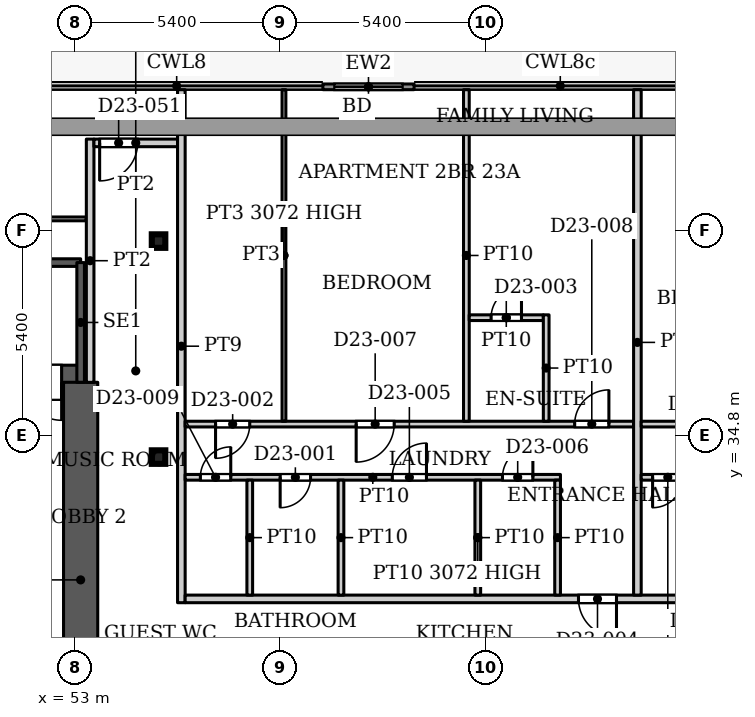
"""IFC4 building model, lengths in metres.
Left out: names, types, materials, properties, quantities, classifications, styles, units other than length and angle.
Written with IfcOpenShell. Run it as: python <this file> out.ifc"""

import sys

from ifc_helpers import new_model, si_unit, direction, frame, frame_2d, origin, origin_2d, place, context, subcontext, project, spatial, rectangle, hollow_rectangle, extrude, source, transform, mapped, element, fill, save


model = new_model("IFC4")
c1 = context("Model", 3, precision=1e-05, world=origin(), true_north=direction((0.0, 1.0)))
c2 = subcontext(c1, "Body", "Model", "MODEL_VIEW")
j1 = project(units=[si_unit("LENGTHUNIT", "METRE"), si_unit("PLANEANGLEUNIT", "RADIAN")], contexts=[c1])
p1 = place(None, origin())
s1 = spatial("IfcSite", under=j1, at=p1, CompositionType="ELEMENT")
p2 = place(p1, origin())
s2 = spatial("IfcBuilding", under=s1, at=p2, CompositionType="ELEMENT")
p3 = place(p2, frame((0.0, 0.0, 101.9)))
s3 = spatial("IfcBuildingStorey", under=s2, at=p3, CompositionType="ELEMENT", Elevation=101.9)
for number, where, z_axis, x_axis in (
    (1, (55.2, 34.232, 0.0), (0.0, 0.0, 1.0), (1.0, 0.0, 0.0)),
    (2, (55.2, 39.916, 0.0), (0.0, 0.0, 1.0), (1.0, 0.0, 0.0)),
):
    element("IfcColumn", number, at=place(p3, frame(where, z_axis=z_axis, x_axis=x_axis)), inside=s3, PredefinedType="COLUMN", context=c2, shape_type="SweptSolid", body=[
        extrude(hollow_rectangle(XDim=0.356, YDim=0.356, WallThickness=0.016, InnerFilletRadius=0.016, OuterFilletRadius=0.032, at=origin_2d()), origin(), (0.0, 0.0, 1.0), 3.9),
    ])
p4 = place(p3, frame((34.75, 36.2, 0.0), z_axis=(0.0, 0.0, 1.0), x_axis=(1.0, 0.0, 0.0)))
e3 = element("IfcWall", 3, at=p4, inside=s3, PredefinedType="SHEAR", context=c2, shape_type="SweptSolid", body=[
    extrude(rectangle(XDim=18.4, YDim=0.9, at=frame_2d((9.2, 0.0))), origin(), (0.0, 0.0, 1.0), 3.9),
])
p5 = place(p4, frame((16.9, 0.0, 0.0)))
e4 = element("IfcOpeningElement", 4, at=p5, cuts=e3, PredefinedType="OPENING", context=c2, shape_type="SweptSolid", body=[
    extrude(rectangle(XDim=1.0, YDim=2.2, at=frame_2d((0.5, 1.1))), frame((0.0, 0.46, 0.0), z_axis=(0.0, -1.0, 0.0), x_axis=(1.0, 0.0, 0.0)), (0.0, 0.0, 1.0), 0.92),
])
p6 = place(p3, frame((53.15, 25.8, 0.0), z_axis=(0.0, 0.0, 1.0), x_axis=(0.0, 1.0, 0.0)))
e5 = element("IfcWall", 5, at=p6, inside=s3, PredefinedType="SHEAR", context=c2, shape_type="SweptSolid", body=[
    extrude(rectangle(XDim=10.4, YDim=0.9, at=frame_2d((5.2, 0.0))), origin(), (0.0, 0.0, 1.0), 3.9),
])
p7 = place(p3, frame((59.524, 43.975, 0.0), z_axis=(0.0, 0.0, 1.0), x_axis=(1.0, 0.0, 0.0)))
e6 = element("IfcWall", 6, at=p7, inside=s3, PredefinedType="SOLIDWALL", context=c2, shape_type="SweptSolid", body=[
    extrude(rectangle(XDim=2.4, YDim=0.15, at=frame_2d((1.2, 0.0))), origin(), (0.0, 0.0, 1.0), 3.75),
])
p8 = place(p7, frame((0.3, 0.0, 0.0)))
e7 = element("IfcOpeningElement", 7, at=p8, cuts=e6, PredefinedType="OPENING", context=c2, shape_type="SweptSolid", body=[
    extrude(rectangle(XDim=1.8, YDim=2.4, at=frame_2d((0.9, 1.2))), frame((0.0, 0.085, 0.0), z_axis=(0.0, -1.0, 0.0), x_axis=(1.0, 0.0, 0.0)), (0.0, 0.0, 1.0), 0.17),
])
p9 = place(p3, frame((43.99, 39.35, 0.0), z_axis=(0.0, 0.0, 1.0), x_axis=(1.0, 0.0, 0.0)))
e8 = element("IfcWall", 8, at=p9, inside=s3, PredefinedType="SHEAR", context=c2, shape_type="SweptSolid", body=[
    extrude(rectangle(XDim=9.16, YDim=0.2, at=frame_2d((4.58, 0.0))), origin(), (0.0, 0.0, 1.0), 3.9),
])
p10 = place(p3, frame((53.15, 36.2, 0.0), z_axis=(0.0, 0.0, 1.0), x_axis=(0.0, 1.0, 0.0)))
e9 = element("IfcWall", 9, at=p10, inside=s3, PredefinedType="SHEAR", context=c2, shape_type="SweptSolid", body=[
    extrude(rectangle(XDim=3.15, YDim=0.2, at=frame_2d((1.575, 0.0))), origin(), (0.0, 0.0, 1.0), 3.9),
])
p11 = place(p3, frame((38.449, 40.5, 0.0), z_axis=(0.0, 0.0, 1.0), x_axis=(1.0, 0.0, 0.0)))
e10 = element("IfcWall", 10, at=p11, inside=s3, PredefinedType="PARTITIONING", context=c2, shape_type="SweptSolid", body=[
    extrude(rectangle(XDim=14.851, YDim=0.1, at=frame_2d((7.426, 0.0))), origin(), (0.0, 0.0, 1.0), 3.6),
])
p12 = place(p11, frame((6.751, 0.0, 0.0)))
e11 = element("IfcOpeningElement", 11, at=p12, cuts=e10, PredefinedType="OPENING", context=c2, shape_type="SweptSolid", body=[
    extrude(rectangle(XDim=1.0, YDim=2.1, at=frame_2d((0.5, 1.05))), frame((0.0, 0.06, 0.0), z_axis=(0.0, -1.0, 0.0), x_axis=(1.0, 0.0, 0.0)), (0.0, 0.0, 1.0), 0.12),
])
p13 = place(p3, frame((53.4, 36.199, 0.0), z_axis=(0.0, 0.0, 1.0), x_axis=(0.0, 1.0, 0.0)))
e12 = element("IfcWall", 12, at=p13, inside=s3, PredefinedType="PARTITIONING", context=c2, shape_type="SweptSolid", body=[
    extrude(rectangle(XDim=6.401, YDim=0.2, at=frame_2d((3.201, 0.0))), origin(), (0.0, 0.0, 1.0), 3.6),
])
p14 = place(p3, frame((53.5, 42.5, 0.0), z_axis=(0.0, 0.0, 1.0), x_axis=(1.0, 0.0, 0.0)))
e13 = element("IfcWall", 13, at=p14, inside=s3, PredefinedType="PARTITIONING", context=c2, shape_type="SweptSolid", body=[
    extrude(rectangle(XDim=2.2, YDim=0.2, at=frame_2d((1.1, 0.0))), origin(), (0.0, 0.0, 1.0), 3.6),
])
p15 = place(p14, frame((0.15, 0.0, 0.0)))
e14 = element("IfcOpeningElement", 14, at=p15, cuts=e13, PredefinedType="OPENING", context=c2, shape_type="SweptSolid", body=[
    extrude(rectangle(XDim=1.0, YDim=2.1, at=frame_2d((0.5, 1.05))), frame((0.0, 0.11, 0.0), z_axis=(0.0, -1.0, 0.0), x_axis=(1.0, 0.0, 0.0)), (0.0, 0.0, 1.0), 0.22),
])
p16 = place(p3, frame((55.8, 30.4, 0.0), z_axis=(0.0, 0.0, 1.0), x_axis=(0.0, 1.0, 0.0)))
e15 = element("IfcWall", 15, at=p16, inside=s3, PredefinedType="PARTITIONING", context=c2, shape_type="SweptSolid", body=[
    extrude(rectangle(XDim=13.5, YDim=0.2, at=frame_2d((6.75, 0.0))), origin(), (0.0, 0.0, 1.0), 3.6),
])
p17 = place(p3, frame((55.9, 30.5, 0.0), z_axis=(0.0, 0.0, 1.0), x_axis=(1.0, 0.0, 0.0)))
e16 = element("IfcWall", 16, at=p17, inside=s3, PredefinedType="PARTITIONING", context=c2, shape_type="SweptSolid", body=[
    extrude(rectangle(XDim=42.2, YDim=0.2, at=frame_2d((21.1, 0.0))), origin(), (0.0, 0.0, 1.0), 3.6),
])
p18 = place(p17, frame((10.35, 0.0, 0.0)))
e17 = element("IfcOpeningElement", 17, at=p18, cuts=e16, PredefinedType="OPENING", context=c2, shape_type="SweptSolid", body=[
    extrude(rectangle(XDim=1.0, YDim=2.1, at=frame_2d((0.5, 1.05))), frame((0.0, 0.11, 0.0), z_axis=(0.0, -1.0, 0.0), x_axis=(1.0, 0.0, 0.0)), (0.0, 0.0, 1.0), 0.22),
])
p19 = place(p17, frame((16.65, 0.0, 0.0)))
e18 = element("IfcOpeningElement", 18, at=p19, cuts=e16, PredefinedType="OPENING", context=c2, shape_type="SweptSolid", body=[
    extrude(rectangle(XDim=1.0, YDim=2.1, at=frame_2d((0.5, 1.05))), frame((0.0, 0.11, 0.0), z_axis=(0.0, -1.0, 0.0), x_axis=(1.0, 0.0, 0.0)), (0.0, 0.0, 1.0), 0.22),
])
p20 = place(p17, frame((27.6, 0.0, 0.0)))
e19 = element("IfcOpeningElement", 19, at=p20, cuts=e16, PredefinedType="OPENING", context=c2, shape_type="SweptSolid", body=[
    extrude(rectangle(XDim=1.0, YDim=2.1, at=frame_2d((0.5, 1.05))), frame((0.0, 0.11, 0.0), z_axis=(0.0, -1.0, 0.0), x_axis=(1.0, 0.0, 0.0)), (0.0, 0.0, 1.0), 0.22),
])
p21 = place(p17, frame((36.0, 0.0, 0.0)))
e20 = element("IfcOpeningElement", 20, at=p21, cuts=e16, PredefinedType="OPENING", context=c2, shape_type="SweptSolid", body=[
    extrude(rectangle(XDim=1.0, YDim=2.1, at=frame_2d((0.5, 1.05))), frame((0.0, 0.11, 0.0), z_axis=(0.0, -1.0, 0.0), x_axis=(1.0, 0.0, 0.0)), (0.0, 0.0, 1.0), 0.22),
])
p22 = place(p3, frame((55.9, 33.7, 0.0), z_axis=(0.0, 0.0, 1.0), x_axis=(1.0, 0.0, 0.0)))
e21 = element("IfcWall", 21, at=p22, inside=s3, PredefinedType="PARTITIONING", context=c2, shape_type="SweptSolid", body=[
    extrude(rectangle(XDim=9.875, YDim=0.15, at=frame_2d((4.938, 0.0))), origin(), (0.0, 0.0, 1.0), 3.6),
])
p23 = place(p22, frame((2.5, 0.0, 0.0)))
e22 = element("IfcOpeningElement", 22, at=p23, cuts=e21, PredefinedType="OPENING", context=c2, shape_type="SweptSolid", body=[
    extrude(rectangle(XDim=0.8, YDim=2.1, at=frame_2d((0.4, 1.05))), frame((0.0, 0.085, 0.0), z_axis=(0.0, -1.0, 0.0), x_axis=(1.0, 0.0, 0.0)), (0.0, 0.0, 1.0), 0.17),
])
p24 = place(p22, frame((5.45, 0.0, 0.0)))
e23 = element("IfcOpeningElement", 23, at=p24, cuts=e21, PredefinedType="OPENING", context=c2, shape_type="SweptSolid", body=[
    extrude(rectangle(XDim=0.9, YDim=2.1, at=frame_2d((0.45, 1.05))), frame((0.0, 0.085, 0.0), z_axis=(0.0, -1.0, 0.0), x_axis=(1.0, 0.0, 0.0)), (0.0, 0.0, 1.0), 0.17),
])
p25 = place(p22, frame((8.35, 0.0, 0.0)))
e24 = element("IfcOpeningElement", 24, at=p25, cuts=e21, PredefinedType="OPENING", context=c2, shape_type="SweptSolid", body=[
    extrude(rectangle(XDim=0.8, YDim=2.1, at=frame_2d((0.4, 1.05))), frame((0.0, 0.085, 0.0), z_axis=(0.0, -1.0, 0.0), x_axis=(1.0, 0.0, 0.0)), (0.0, 0.0, 1.0), 0.17),
])
p26 = place(p22, frame((0.4, 0.0, 0.0)))
e25 = element("IfcOpeningElement", 25, at=p26, cuts=e21, PredefinedType="OPENING", context=c2, shape_type="SweptSolid", body=[
    extrude(rectangle(XDim=0.8, YDim=2.1, at=frame_2d((0.4, 1.05))), frame((0.0, 0.085, 0.0), z_axis=(0.0, -1.0, 0.0), x_axis=(1.0, 0.0, 0.0)), (0.0, 0.0, 1.0), 0.17),
])
p27 = place(p3, frame((55.9, 35.1, 0.0), z_axis=(0.0, 0.0, 1.0), x_axis=(1.0, 0.0, 0.0)))
e26 = element("IfcWall", 26, at=p27, inside=s3, PredefinedType="PARTITIONING", context=c2, shape_type="SweptSolid", body=[
    extrude(rectangle(XDim=11.8, YDim=0.15, at=frame_2d((5.9, 0.0))), origin(), (0.0, 0.0, 1.0), 3.6),
])
p28 = place(p27, frame((0.8, 0.0, 0.0)))
e27 = element("IfcOpeningElement", 27, at=p28, cuts=e26, PredefinedType="OPENING", context=c2, shape_type="SweptSolid", body=[
    extrude(rectangle(XDim=0.9, YDim=2.1, at=frame_2d((0.45, 1.05))), frame((0.0, 0.085, 0.0), z_axis=(0.0, -1.0, 0.0), x_axis=(1.0, 0.0, 0.0)), (0.0, 0.0, 1.0), 0.17),
])
p29 = place(p27, frame((4.5, 0.0, 0.0)))
e28 = element("IfcOpeningElement", 28, at=p29, cuts=e26, PredefinedType="OPENING", context=c2, shape_type="SweptSolid", body=[
    extrude(rectangle(XDim=1.0, YDim=2.1, at=frame_2d((0.5, 1.05))), frame((0.0, 0.085, 0.0), z_axis=(0.0, -1.0, 0.0), x_axis=(1.0, 0.0, 0.0)), (0.0, 0.0, 1.0), 0.17),
])
p30 = place(p27, frame((10.25, 0.0, 0.0)))
e29 = element("IfcOpeningElement", 29, at=p30, cuts=e26, PredefinedType="OPENING", context=c2, shape_type="SweptSolid", body=[
    extrude(rectangle(XDim=0.9, YDim=2.1, at=frame_2d((0.45, 1.05))), frame((0.0, 0.085, 0.0), z_axis=(0.0, -1.0, 0.0), x_axis=(1.0, 0.0, 0.0)), (0.0, 0.0, 1.0), 0.17),
])
p31 = place(p3, frame((57.6, 30.6, 0.0), z_axis=(0.0, 0.0, 1.0), x_axis=(0.0, 1.0, 0.0)))
e30 = element("IfcWall", 30, at=p31, inside=s3, PredefinedType="PARTITIONING", context=c2, shape_type="SweptSolid", body=[
    extrude(rectangle(XDim=3.025, YDim=0.15, at=frame_2d((1.512, 0.0))), origin(), (0.0, 0.0, 1.0), 3.6),
])
p32 = place(p3, frame((58.5, 35.175, 0.0), z_axis=(0.0, 0.0, 1.0), x_axis=(0.0, 1.0, 0.0)))
e31 = element("IfcWall", 31, at=p32, inside=s3, PredefinedType="PARTITIONING", context=c2, shape_type="SweptSolid", body=[
    extrude(rectangle(XDim=8.725, YDim=0.1, at=frame_2d((4.362, 0.0))), origin(), (0.0, 0.0, 1.0), 3.072),
])
p33 = place(p3, frame((60.0, 30.6, 0.0), z_axis=(0.0, 0.0, 1.0), x_axis=(0.0, 1.0, 0.0)))
e32 = element("IfcWall", 32, at=p33, inside=s3, PredefinedType="PARTITIONING", context=c2, shape_type="SweptSolid", body=[
    extrude(rectangle(XDim=3.025, YDim=0.15, at=frame_2d((1.512, 0.0))), origin(), (0.0, 0.0, 1.0), 3.6),
])
p34 = place(p3, frame((63.3, 35.175, 0.0), z_axis=(0.0, 0.0, 1.0), x_axis=(0.0, 1.0, 0.0)))
e33 = element("IfcWall", 33, at=p34, inside=s3, PredefinedType="PARTITIONING", context=c2, shape_type="SweptSolid", body=[
    extrude(rectangle(XDim=8.725, YDim=0.15, at=frame_2d((4.362, 0.0))), origin(), (0.0, 0.0, 1.0), 3.6),
])
p35 = place(p3, frame((63.375, 37.9, 0.0), z_axis=(0.0, 0.0, 1.0), x_axis=(1.0, 0.0, 0.0)))
e34 = element("IfcWall", 34, at=p35, inside=s3, PredefinedType="PARTITIONING", context=c2, shape_type="SweptSolid", body=[
    extrude(rectangle(XDim=1.95, YDim=0.15, at=frame_2d((0.975, 0.0))), origin(), (0.0, 0.0, 1.0), 3.6),
])
p36 = place(p35, frame((0.575, 0.0, 0.0)))
e35 = element("IfcOpeningElement", 35, at=p36, cuts=e34, PredefinedType="OPENING", context=c2, shape_type="SweptSolid", body=[
    extrude(rectangle(XDim=0.8, YDim=2.1, at=frame_2d((0.4, 1.05))), frame((0.0, 0.085, 0.0), z_axis=(0.0, -1.0, 0.0), x_axis=(1.0, 0.0, 0.0)), (0.0, 0.0, 1.0), 0.17),
])
p37 = place(p3, frame((63.6, 30.6, 0.0), z_axis=(0.0, 0.0, 1.0), x_axis=(0.0, 1.0, 0.0)))
e36 = element("IfcWall", 36, at=p37, inside=s3, PredefinedType="PARTITIONING", context=c2, shape_type="SweptSolid", body=[
    extrude(rectangle(XDim=3.025, YDim=0.15, at=frame_2d((1.512, 0.0))), origin(), (0.0, 0.0, 1.0), 3.072),
])
p38 = place(p3, frame((65.4, 35.175, 0.0), z_axis=(0.0, 0.0, 1.0), x_axis=(0.0, 1.0, 0.0)))
e37 = element("IfcWall", 37, at=p38, inside=s3, PredefinedType="PARTITIONING", context=c2, shape_type="SweptSolid", body=[
    extrude(rectangle(XDim=2.8, YDim=0.15, at=frame_2d((1.4, 0.0))), origin(), (0.0, 0.0, 1.0), 3.6),
])
p39 = place(p3, frame((65.7, 30.6, 0.0), z_axis=(0.0, 0.0, 1.0), x_axis=(0.0, 1.0, 0.0)))
e38 = element("IfcWall", 38, at=p39, inside=s3, PredefinedType="PARTITIONING", context=c2, shape_type="SweptSolid", body=[
    extrude(rectangle(XDim=3.025, YDim=0.15, at=frame_2d((1.512, 0.0))), origin(), (0.0, 0.0, 1.0), 3.6),
])
p40 = place(p3, frame((67.8, 30.6, 0.0), z_axis=(0.0, 0.0, 1.0), x_axis=(0.0, 1.0, 0.0)))
e39 = element("IfcWall", 39, at=p40, inside=s3, PredefinedType="PARTITIONING", context=c2, shape_type="SweptSolid", body=[
    extrude(rectangle(XDim=13.3, YDim=0.2, at=frame_2d((6.65, 0.0))), origin(), (0.0, 0.0, 1.0), 3.6),
])
p41 = place(p3, frame((67.9, 33.7, 0.0), z_axis=(0.0, 0.0, 1.0), x_axis=(1.0, 0.0, 0.0)))
e40 = element("IfcWall", 40, at=p41, inside=s3, PredefinedType="PARTITIONING", context=c2, shape_type="SweptSolid", body=[
    extrude(rectangle(XDim=4.175, YDim=0.15, at=frame_2d((2.087, 0.0))), origin(), (0.0, 0.0, 1.0), 3.6),
])
p42 = place(p41, frame((2.5, 0.0, 0.0)))
e41 = element("IfcOpeningElement", 41, at=p42, cuts=e40, PredefinedType="OPENING", context=c2, shape_type="SweptSolid", body=[
    extrude(rectangle(XDim=0.8, YDim=2.1, at=frame_2d((0.4, 1.05))), frame((0.0, 0.085, 0.0), z_axis=(0.0, -1.0, 0.0), x_axis=(1.0, 0.0, 0.0)), (0.0, 0.0, 1.0), 0.17),
])
p43 = place(p41, frame((0.3, 0.0, 0.0)))
e42 = element("IfcOpeningElement", 42, at=p43, cuts=e40, PredefinedType="OPENING", context=c2, shape_type="SweptSolid", body=[
    extrude(rectangle(XDim=0.8, YDim=2.1, at=frame_2d((0.4, 1.05))), frame((0.0, 0.085, 0.0), z_axis=(0.0, -1.0, 0.0), x_axis=(1.0, 0.0, 0.0)), (0.0, 0.0, 1.0), 0.17),
])
p44 = place(p3, frame((67.9, 35.1, 0.0), z_axis=(0.0, 0.0, 1.0), x_axis=(1.0, 0.0, 0.0)))
e43 = element("IfcWall", 43, at=p44, inside=s3, PredefinedType="PARTITIONING", context=c2, shape_type="SweptSolid", body=[
    extrude(rectangle(XDim=9.4, YDim=0.15, at=frame_2d((4.7, 0.0))), origin(), (0.0, 0.0, 1.0), 3.6),
])
p45 = place(p44, frame((1.4, 0.0, 0.0)))
e44 = element("IfcOpeningElement", 44, at=p45, cuts=e43, PredefinedType="OPENING", context=c2, shape_type="SweptSolid", body=[
    extrude(rectangle(XDim=0.9, YDim=2.1, at=frame_2d((0.45, 1.05))), frame((0.0, 0.085, 0.0), z_axis=(0.0, -1.0, 0.0), x_axis=(1.0, 0.0, 0.0)), (0.0, 0.0, 1.0), 0.17),
])
p46 = place(p44, frame((6.15, 0.0, 0.0)))
e45 = element("IfcOpeningElement", 45, at=p46, cuts=e43, PredefinedType="OPENING", context=c2, shape_type="SweptSolid", body=[
    extrude(rectangle(XDim=1.0, YDim=2.1, at=frame_2d((0.5, 1.05))), frame((0.0, 0.085, 0.0), z_axis=(0.0, -1.0, 0.0), x_axis=(1.0, 0.0, 0.0)), (0.0, 0.0, 1.0), 0.17),
])
m1 = source(origin(), c2, "Body", "SweptSolid", [
    extrude(rectangle(XDim=1.8, YDim=2.4, at=frame_2d((0.9, 1.2))), frame((0.0, 0.025, 0.0), z_axis=(0.0, -1.0, 0.0), x_axis=(1.0, 0.0, 0.0)), (0.0, 0.0, 1.0), 0.05),
])
p47 = place(p8, origin())
e46 = element("IfcDoor", 46, at=p47, inside=s3, OperationType="SLIDING_TO_LEFT", PredefinedType="DOOR", context=c2, shape_type="MappedRepresentation", body=[
    mapped(m1, transform((0.0, 0.0, 0.0), x_axis=(1.0, 0.0, 0.0), y_axis=(0.0, 1.0, 0.0), z_axis=(0.0, 0.0, 1.0), scale=1.0)),
])
fill(e7, e46)
m2 = source(origin(), c2, "Body", "SweptSolid", [
    extrude(rectangle(XDim=1.0, YDim=2.2, at=frame_2d((0.5, 1.1))), frame((0.0, 0.025, 0.0), z_axis=(0.0, -1.0, 0.0), x_axis=(1.0, 0.0, 0.0)), (0.0, 0.0, 1.0), 0.05),
])
p48 = place(p5, origin())
e47 = element("IfcDoor", 47, at=p48, inside=s3, OperationType="SINGLE_SWING_RIGHT", PredefinedType="DOOR", context=c2, shape_type="MappedRepresentation", body=[
    mapped(m2, transform((0.0, 0.0, 0.0), x_axis=(1.0, 0.0, 0.0), y_axis=(0.0, 1.0, 0.0), z_axis=(0.0, 0.0, 1.0), scale=1.0)),
])
fill(e4, e47)
m3 = source(origin(), c2, "Body", "SweptSolid", [
    extrude(rectangle(XDim=0.8, YDim=2.1, at=frame_2d((0.4, 1.05))), frame((0.0, 0.025, 0.0), z_axis=(0.0, -1.0, 0.0), x_axis=(1.0, 0.0, 0.0)), (0.0, 0.0, 1.0), 0.05),
])
p49 = place(p23, origin())
e48 = element("IfcDoor", 48, at=p49, inside=s3, OperationType="SINGLE_SWING_RIGHT", PredefinedType="DOOR", context=c2, shape_type="MappedRepresentation", body=[
    mapped(m3, transform((0.0, 0.0, 0.0), x_axis=(1.0, 0.0, 0.0), y_axis=(0.0, 1.0, 0.0), z_axis=(0.0, 0.0, 1.0), scale=1.0)),
])
fill(e22, e48)
m4 = source(origin(), c2, "Body", "SweptSolid", [
    extrude(rectangle(XDim=0.9, YDim=2.1, at=frame_2d((0.45, 1.05))), frame((0.0, 0.025, 0.0), z_axis=(0.0, -1.0, 0.0), x_axis=(1.0, 0.0, 0.0)), (0.0, 0.0, 1.0), 0.05),
])
p50 = place(p28, origin())
e49 = element("IfcDoor", 49, at=p50, inside=s3, OperationType="SINGLE_SWING_RIGHT", PredefinedType="DOOR", context=c2, shape_type="MappedRepresentation", body=[
    mapped(m4, transform((0.0, 0.0, 0.0), x_axis=(1.0, 0.0, 0.0), y_axis=(0.0, 1.0, 0.0), z_axis=(0.0, 0.0, 1.0), scale=1.0)),
])
fill(e27, e49)
p51 = place(p36, origin())
e50 = element("IfcDoor", 50, at=p51, inside=s3, OperationType="SINGLE_SWING_LEFT", PredefinedType="DOOR", context=c2, shape_type="MappedRepresentation", body=[
    mapped(m3, transform((0.0, 0.0, 0.0), x_axis=(1.0, 0.0, 0.0), y_axis=(0.0, 1.0, 0.0), z_axis=(0.0, 0.0, 1.0), scale=1.0)),
])
fill(e35, e50)
m5 = source(origin(), c2, "Body", "SweptSolid", [
    extrude(rectangle(XDim=1.0, YDim=2.1, at=frame_2d((0.5, 1.05))), frame((0.0, 0.025, 0.0), z_axis=(0.0, -1.0, 0.0), x_axis=(1.0, 0.0, 0.0)), (0.0, 0.0, 1.0), 0.05),
])
p52 = place(p18, origin())
e51 = element("IfcDoor", 51, at=p52, inside=s3, OperationType="SINGLE_SWING_RIGHT", PredefinedType="DOOR", context=c2, shape_type="MappedRepresentation", body=[
    mapped(m5, transform((0.0, 0.0, 0.0), x_axis=(1.0, 0.0, 0.0), y_axis=(0.0, 1.0, 0.0), z_axis=(0.0, 0.0, 1.0), scale=1.0)),
])
fill(e17, e51)
p53 = place(p24, origin())
e52 = element("IfcDoor", 52, at=p53, inside=s3, OperationType="SINGLE_SWING_LEFT", PredefinedType="DOOR", context=c2, shape_type="MappedRepresentation", body=[
    mapped(m4, transform((0.0, 0.0, 0.0), x_axis=(1.0, 0.0, 0.0), y_axis=(0.0, 1.0, 0.0), z_axis=(0.0, 0.0, 1.0), scale=1.0)),
])
fill(e23, e52)
p54 = place(p25, origin())
e53 = element("IfcDoor", 53, at=p54, inside=s3, OperationType="SINGLE_SWING_LEFT", PredefinedType="DOOR", context=c2, shape_type="MappedRepresentation", body=[
    mapped(m3, transform((0.0, 0.0, 0.0), x_axis=(1.0, 0.0, 0.0), y_axis=(0.0, 1.0, 0.0), z_axis=(0.0, 0.0, 1.0), scale=1.0)),
])
fill(e24, e53)
m6 = source(origin(), c2, "Body", "SweptSolid", [
    extrude(rectangle(XDim=1.0, YDim=2.1, at=frame_2d((0.5, 1.05))), frame((0.0, 0.025, 0.0), z_axis=(0.0, -1.0, 0.0), x_axis=(1.0, 0.0, 0.0)), (0.0, 0.0, 1.0), 0.05),
])
p55 = place(p29, origin())
e54 = element("IfcDoor", 54, at=p55, inside=s3, OperationType="SINGLE_SWING_RIGHT", PredefinedType="DOOR", context=c2, shape_type="MappedRepresentation", body=[
    mapped(m6, transform((0.0, 0.0, 0.0), x_axis=(1.0, 0.0, 0.0), y_axis=(0.0, 1.0, 0.0), z_axis=(0.0, 0.0, 1.0), scale=1.0)),
])
fill(e28, e54)
p56 = place(p30, origin())
e55 = element("IfcDoor", 55, at=p56, inside=s3, OperationType="SINGLE_SWING_LEFT", PredefinedType="DOOR", context=c2, shape_type="MappedRepresentation", body=[
    mapped(m4, transform((0.0, 0.0, 0.0), x_axis=(1.0, 0.0, 0.0), y_axis=(0.0, 1.0, 0.0), z_axis=(0.0, 0.0, 1.0), scale=1.0)),
])
fill(e29, e55)
p57 = place(p26, origin())
e56 = element("IfcDoor", 56, at=p57, inside=s3, OperationType="SINGLE_SWING_LEFT", PredefinedType="DOOR", context=c2, shape_type="MappedRepresentation", body=[
    mapped(m3, transform((0.0, 0.0, 0.0), x_axis=(1.0, 0.0, 0.0), y_axis=(0.0, 1.0, 0.0), z_axis=(0.0, 0.0, 1.0), scale=1.0)),
])
fill(e25, e56)
p58 = place(p43, origin())
e57 = element("IfcDoor", 57, at=p58, inside=s3, OperationType="SINGLE_SWING_RIGHT", PredefinedType="DOOR", context=c2, shape_type="MappedRepresentation", body=[
    mapped(m3, transform((0.0, 0.0, 0.0), x_axis=(1.0, 0.0, 0.0), y_axis=(0.0, 1.0, 0.0), z_axis=(0.0, 0.0, 1.0), scale=1.0)),
])
fill(e42, e57)
m7 = source(origin(), c2, "Body", "SweptSolid", [
    extrude(rectangle(XDim=1.0, YDim=2.1, at=frame_2d((0.5, 1.05))), frame((0.0, 0.025, 0.0), z_axis=(0.0, -1.0, 0.0), x_axis=(1.0, 0.0, 0.0)), (0.0, 0.0, 1.0), 0.05),
])
p59 = place(p15, origin())
e58 = element("IfcDoor", 58, at=p59, inside=s3, OperationType="SINGLE_SWING_RIGHT", PredefinedType="DOOR", context=c2, shape_type="MappedRepresentation", body=[
    mapped(m7, transform((0.0, 0.0, 0.0), x_axis=(1.0, 0.0, 0.0), y_axis=(0.0, 1.0, 0.0), z_axis=(0.0, 0.0, 1.0), scale=1.0)),
])
fill(e14, e58)
save(model, sys.argv[1])
